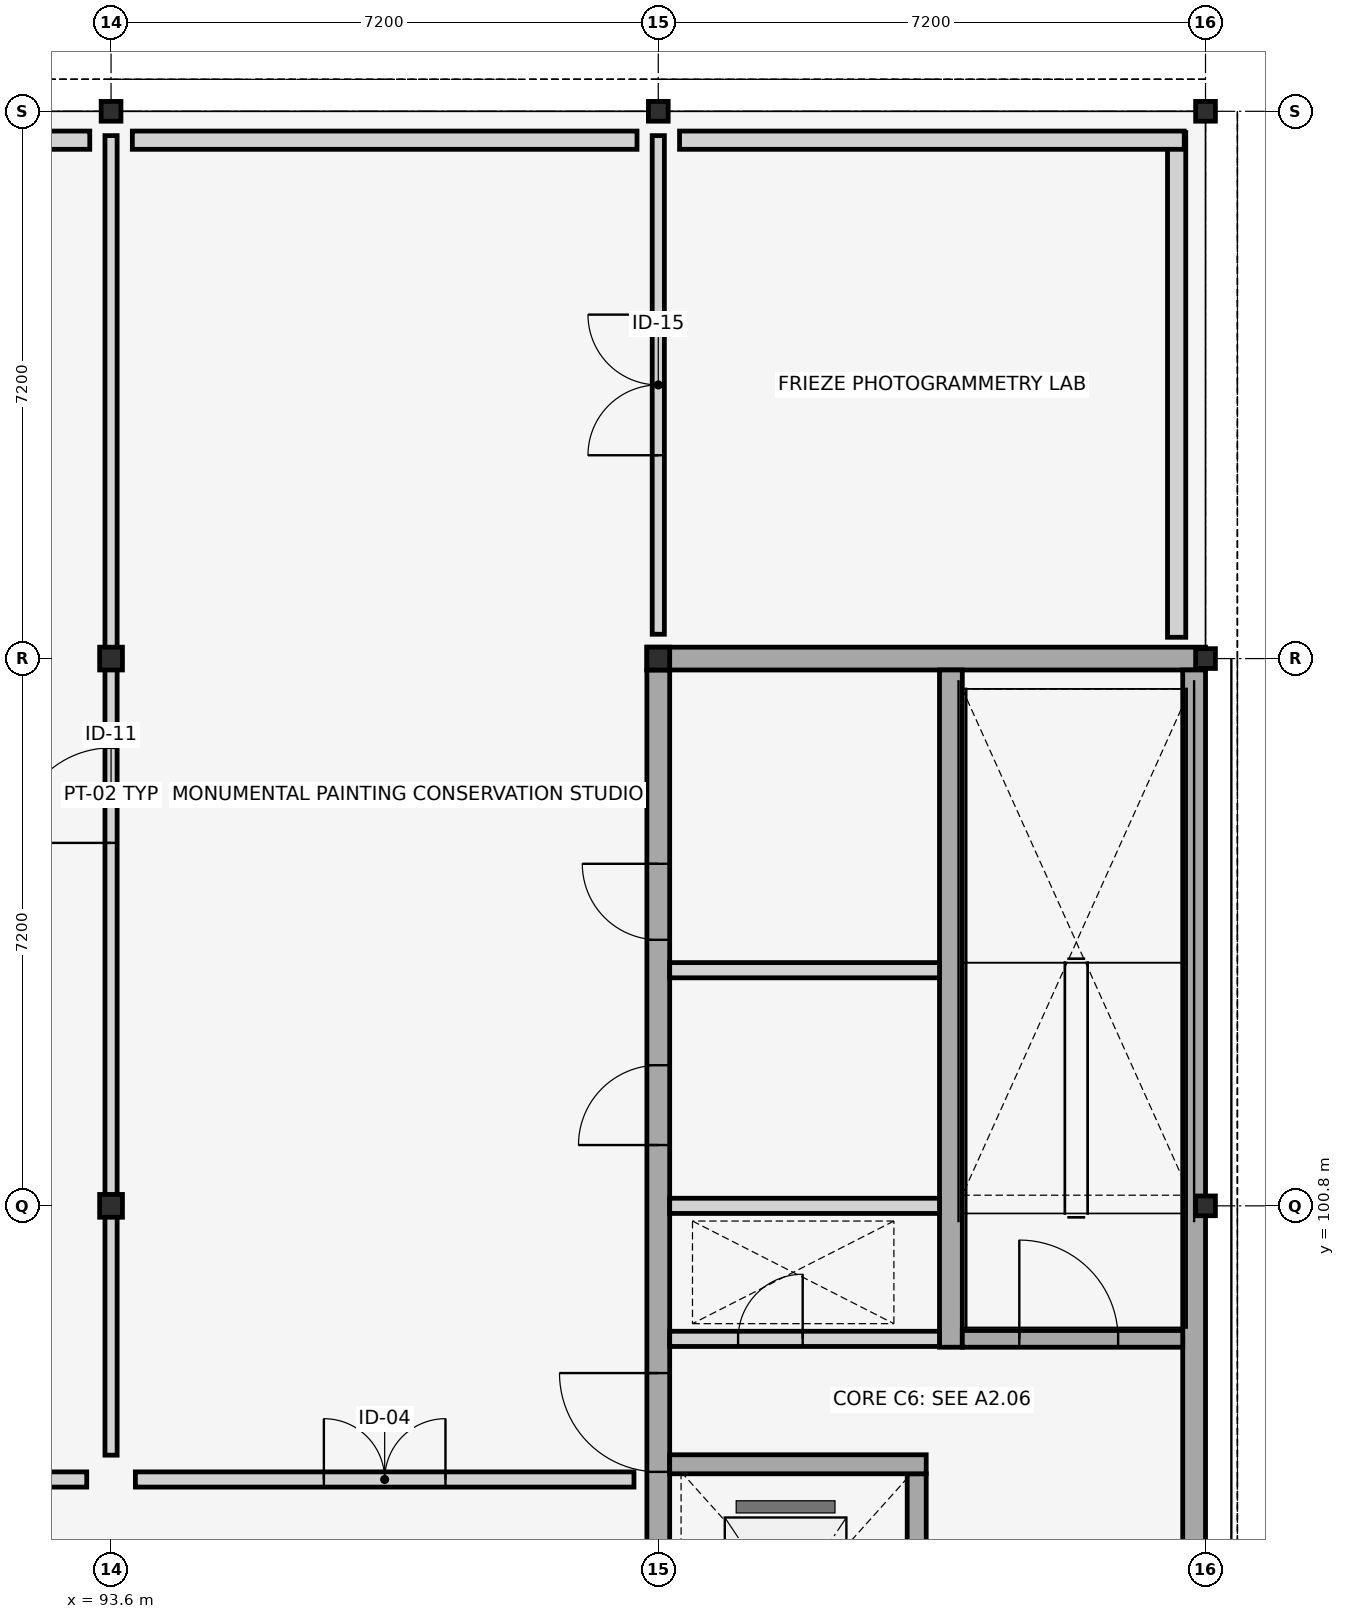
"""IFC4 building model, lengths in metres.
Left out: names, types, materials, properties, quantities, classifications, styles, units other than length and angle.
Written with IfcOpenShell. Run it as: python <this file> out.ifc"""

import sys

from ifc_helpers import new_model, si_unit, direction, frame, frame_2d, origin, origin_2d, place, context, subcontext, project, spatial, rectangle, i_section, extrude, element, fill, save


model = new_model("IFC4")
c1 = context("Model", 3, precision=1e-05, world=origin(), true_north=direction((0.0, 1.0)))
c2 = subcontext(c1, "Body", "Model", "MODEL_VIEW")
j1 = project(units=[si_unit("LENGTHUNIT", "METRE"), si_unit("PLANEANGLEUNIT", "RADIAN")], contexts=[c1])
p1 = place(None, origin())
s1 = spatial("IfcSite", under=j1, at=p1, CompositionType="ELEMENT")
p2 = place(p1, origin())
s2 = spatial("IfcBuilding", under=s1, at=p2, CompositionType="ELEMENT")
p3 = place(p2, frame((0.0, 0.0, 17.1)))
s3 = spatial("IfcBuildingStorey", under=s2, at=p3, CompositionType="ELEMENT", Elevation=17.1)
for number, where, z_axis, x_axis in (
    (1, (93.6, 100.8, 0.0), (0.0, 0.0, 1.0), (0.0, 1.0, 0.0)),
    (2, (93.6, 108.0, 0.0), (0.0, 0.0, 1.0), (1.0, 0.0, 0.0)),
):
    element("IfcColumn", number, at=place(p3, frame(where, z_axis=z_axis, x_axis=x_axis)), inside=s3, PredefinedType="COLUMN", context=c2, shape_type="SweptSolid", body=[
        extrude(i_section(OverallWidth=0.3, OverallDepth=0.3, WebThickness=0.011, FlangeThickness=0.019, FilletRadius=0.027, at=origin_2d()), origin(), (0.0, 0.0, 1.0), 8.1),
    ])
p4 = place(p3, frame((93.6, 115.2, 0.0), z_axis=(0.0, 0.0, 1.0), x_axis=(0.0, 1.0, 0.0)))
e3 = element("IfcColumn", 3, at=p4, inside=s3, PredefinedType="COLUMN", context=c2, shape_type="SweptSolid", body=[
    extrude(i_section(OverallWidth=0.26, OverallDepth=0.26, WebThickness=0.01, FlangeThickness=0.018, FilletRadius=0.024, at=origin_2d()), origin(), (0.0, 0.0, 1.0), 8.1),
])
p5 = place(p3, frame((100.8, 108.0, 0.0), z_axis=(0.0, 0.0, 1.0), x_axis=(0.0, 1.0, 0.0)))
e4 = element("IfcColumn", 4, at=p5, inside=s3, PredefinedType="COLUMN", context=c2, shape_type="SweptSolid", body=[
    extrude(i_section(OverallWidth=0.3, OverallDepth=0.3, WebThickness=0.011, FlangeThickness=0.019, FilletRadius=0.027, at=origin_2d()), origin(), (0.0, 0.0, 1.0), 8.1),
])
for number, where, z_axis, x_axis in (
    (5, (100.8, 115.2, 0.0), (0.0, 0.0, 1.0), (1.0, 0.0, 0.0)),
    (6, (108.0, 100.8, 0.0), (0.0, 0.0, 1.0), (0.0, 1.0, 0.0)),
    (7, (108.0, 108.0, 0.0), (0.0, 0.0, 1.0), (1.0, 0.0, 0.0)),
    (8, (108.0, 115.2, 0.0), (0.0, 0.0, 1.0), (0.0, 1.0, 0.0)),
):
    element("IfcColumn", number, at=place(p3, frame(where, z_axis=z_axis, x_axis=x_axis)), inside=s3, PredefinedType="COLUMN", context=c2, shape_type="SweptSolid", body=[
        extrude(i_section(OverallWidth=0.26, OverallDepth=0.26, WebThickness=0.01, FlangeThickness=0.018, FilletRadius=0.024, at=origin_2d()), origin(), (0.0, 0.0, 1.0), 8.1),
    ])
for number, where, z_axis, x_axis in (
    (9, (107.62, 108.28, 0.0), (0.0, 0.0, 1.0), (0.0, 1.0, 0.0)),
    (10, (107.72, 114.82, 0.0), (0.0, 0.0, 1.0), (-1.0, 0.0, 0.0)),
):
    element("IfcWall", number, at=place(p3, frame(where, z_axis=z_axis, x_axis=x_axis)), inside=s3, PredefinedType="STANDARD", context=c2, shape_type="SweptSolid", body=[
        extrude(rectangle(XDim=6.64, YDim=0.24, at=frame_2d((3.32, 0.0))), origin(), (0.0, 0.0, 1.0), 7.48),
    ])
for number, where, z_axis, x_axis in (
    (11, (100.52, 114.82, 0.0), (0.0, 0.0, 1.0), (-1.0, 0.0, 0.0)),
    (12, (93.32, 114.82, 0.0), (0.0, 0.0, 1.0), (-1.0, 0.0, 0.0)),
):
    element("IfcWall", number, at=place(p3, frame(where, z_axis=z_axis, x_axis=x_axis)), inside=s3, PredefinedType="STANDARD", context=c2, shape_type="SweptSolid", body=[
        extrude(rectangle(XDim=6.64, YDim=0.24, at=frame_2d((3.32, 0.0))), origin(), (0.0, 0.0, 1.0), 7.48),
    ])
p6 = place(p3, frame((100.65, 108.0, 0.0), z_axis=(0.0, 0.0, 1.0), x_axis=(1.0, 0.0, 0.0)))
e13 = element("IfcWall", 13, at=p6, inside=s3, PredefinedType="SHEAR", context=c2, shape_type="SweptSolid", body=[
    extrude(rectangle(XDim=7.35, YDim=0.3, at=frame_2d((3.675, 0.0))), origin(), (0.0, 0.0, 1.0), 7.88),
])
p7 = place(p3, frame((107.85, 93.75, 0.0), z_axis=(0.0, 0.0, 1.0), x_axis=(0.0, 1.0, 0.0)))
e14 = element("IfcWall", 14, at=p7, inside=s3, PredefinedType="SHEAR", context=c2, shape_type="SweptSolid", body=[
    extrude(rectangle(XDim=14.1, YDim=0.3, at=frame_2d((7.05, 0.0))), origin(), (0.0, 0.0, 1.0), 7.88),
])
p8 = place(p3, frame((100.8, 93.75, 0.0), z_axis=(0.0, 0.0, 1.0), x_axis=(0.0, 1.0, 0.0)))
e15 = element("IfcWall", 15, at=p8, inside=s3, PredefinedType="SHEAR", context=c2, shape_type="SweptSolid", body=[
    extrude(rectangle(XDim=14.1, YDim=0.3, at=frame_2d((7.05, 0.0))), origin(), (0.0, 0.0, 1.0), 7.88),
])
p9 = place(p8, frame((3.55, 0.0, 0.0)))
e16 = element("IfcOpeningElement", 16, at=p9, cuts=e15, PredefinedType="OPENING", context=c2, shape_type="SweptSolid", body=[
    extrude(rectangle(XDim=1.3, YDim=2.2, at=frame_2d((0.65, 1.1))), frame((0.0, 0.16, 0.0), z_axis=(0.0, -1.0, 0.0), x_axis=(1.0, 0.0, 0.0)), (0.0, 0.0, 1.0), 0.32),
])
p10 = place(p8, frame((7.85, 0.0, 0.0)))
e17 = element("IfcOpeningElement", 17, at=p10, cuts=e15, PredefinedType="OPENING", context=c2, shape_type="SweptSolid", body=[
    extrude(rectangle(XDim=1.05, YDim=2.15, at=frame_2d((0.525, 1.075))), frame((0.0, 0.16, 0.0), z_axis=(0.0, -1.0, 0.0), x_axis=(1.0, 0.0, 0.0)), (0.0, 0.0, 1.0), 0.32),
])
p11 = place(p8, frame((10.55, 0.0, 0.0)))
e18 = element("IfcOpeningElement", 18, at=p11, cuts=e15, PredefinedType="OPENING", context=c2, shape_type="SweptSolid", body=[
    extrude(rectangle(XDim=1.0, YDim=2.15, at=frame_2d((0.5, 1.075))), frame((0.0, 0.16, 0.0), z_axis=(0.0, -1.0, 0.0), x_axis=(1.0, 0.0, 0.0)), (0.0, 0.0, 1.0), 0.32),
])
p12 = place(p3, frame((104.2, 93.75, 0.0), z_axis=(0.0, 0.0, 1.0), x_axis=(0.0, 1.0, 0.0)))
e19 = element("IfcWall", 19, at=p12, inside=s3, PredefinedType="SHEAR", context=c2, shape_type="SweptSolid", body=[
    extrude(rectangle(XDim=3.525, YDim=0.25, at=frame_2d((1.762, 0.0))), origin(), (0.0, 0.0, 1.0), 7.88),
])
p13 = place(p12, frame((1.2, 0.0, 0.0)))
e20 = element("IfcOpeningElement", 20, at=p13, cuts=e19, PredefinedType="OPENING", context=c2, shape_type="SweptSolid", body=[
    extrude(rectangle(XDim=1.1, YDim=2.15, at=frame_2d((0.55, 1.075))), frame((0.0, 0.135, 0.0), z_axis=(0.0, -1.0, 0.0), x_axis=(1.0, 0.0, 0.0)), (0.0, 0.0, 1.0), 0.27),
])
p14 = place(p3, frame((104.65, 98.94, 0.0), z_axis=(0.0, 0.0, 1.0), x_axis=(0.0, 1.0, 0.0)))
e21 = element("IfcWall", 21, at=p14, inside=s3, PredefinedType="SHEAR", context=c2, shape_type="SweptSolid", body=[
    extrude(rectangle(XDim=8.91, YDim=0.3, at=frame_2d((4.455, 0.0))), origin(), (0.0, 0.0, 1.0), 7.88),
])
p15 = place(p3, frame((100.95, 99.05, 0.0), z_axis=(0.0, 0.0, 1.0), x_axis=(1.0, 0.0, 0.0)))
e22 = element("IfcWall", 22, at=p15, inside=s3, PredefinedType="PLUMBINGWALL", context=c2, shape_type="SweptSolid", body=[
    extrude(rectangle(XDim=3.55, YDim=0.2, at=frame_2d((1.775, 0.0))), origin(), (0.0, 0.0, 1.0), 7.3),
])
p16 = place(p15, frame((0.9, 0.0, 0.0)))
e23 = element("IfcOpeningElement", 23, at=p16, cuts=e22, PredefinedType="OPENING", context=c2, shape_type="SweptSolid", body=[
    extrude(rectangle(XDim=0.85, YDim=2.05, at=frame_2d((0.425, 1.025))), frame((0.0, 0.11, 0.0), z_axis=(0.0, -1.0, 0.0), x_axis=(1.0, 0.0, 0.0)), (0.0, 0.0, 1.0), 0.22),
])
p17 = place(p3, frame((104.8, 99.05, 0.0), z_axis=(0.0, 0.0, 1.0), x_axis=(1.0, 0.0, 0.0)))
e24 = element("IfcWall", 24, at=p17, inside=s3, PredefinedType="SHEAR", context=c2, shape_type="SweptSolid", body=[
    extrude(rectangle(XDim=2.9, YDim=0.22, at=frame_2d((1.45, 0.0))), origin(), (0.0, 0.0, 1.0), 7.88),
])
p18 = place(p17, frame((0.75, 0.0, 0.0)))
e25 = element("IfcOpeningElement", 25, at=p18, cuts=e24, PredefinedType="OPENING", context=c2, shape_type="SweptSolid", body=[
    extrude(rectangle(XDim=1.3, YDim=2.2, at=frame_2d((0.65, 1.1))), frame((0.0, 0.12, 0.0), z_axis=(0.0, -1.0, 0.0), x_axis=(1.0, 0.0, 0.0)), (0.0, 0.0, 1.0), 0.24),
])
p19 = place(p3, frame((100.95, 97.4, 0.0), z_axis=(0.0, 0.0, 1.0), x_axis=(1.0, 0.0, 0.0)))
e26 = element("IfcWall", 26, at=p19, inside=s3, PredefinedType="SHEAR", context=c2, shape_type="SweptSolid", body=[
    extrude(rectangle(XDim=3.375, YDim=0.25, at=frame_2d((1.688, 0.0))), origin(), (0.0, 0.0, 1.0), 7.88),
])
for number, where, z_axis, x_axis in (
    (27, (100.95, 100.8, 0.0), (0.0, 0.0, 1.0), (1.0, 0.0, 0.0)),
    (28, (100.95, 103.9, 0.0), (0.0, 0.0, 1.0), (1.0, 0.0, 0.0)),
):
    element("IfcWall", number, at=place(p3, frame(where, z_axis=z_axis, x_axis=x_axis)), inside=s3, PredefinedType="PLUMBINGWALL", context=c2, shape_type="SweptSolid", body=[
        extrude(rectangle(XDim=3.55, YDim=0.2, at=frame_2d((1.775, 0.0))), origin(), (0.0, 0.0, 1.0), 7.3),
    ])
p20 = place(p3, frame((65.12, 97.2, 0.0), z_axis=(0.0, 0.0, 1.0), x_axis=(1.0, 0.0, 0.0)))
e29 = element("IfcWall", 29, at=p20, inside=s3, PredefinedType="PARTITIONING", context=c2, shape_type="SweptSolid", body=[
    extrude(rectangle(XDim=28.16, YDim=0.2, at=frame_2d((14.08, 0.0))), origin(), (0.0, 0.0, 1.0), 7.05),
])
p21 = place(p20, frame((1.649, 0.0, 0.0)))
e30 = element("IfcOpeningElement", 30, at=p21, cuts=e29, PredefinedType="OPENING", context=c2, shape_type="SweptSolid", body=[
    extrude(rectangle(XDim=1.6, YDim=2.35, at=frame_2d((0.8, 1.175))), frame((0.0, 0.11, 0.0), z_axis=(0.0, -1.0, 0.0), x_axis=(1.0, 0.0, 0.0)), (0.0, 0.0, 1.0), 0.22),
])
p22 = place(p3, frame((93.92, 97.2, 0.0), z_axis=(0.0, 0.0, 1.0), x_axis=(1.0, 0.0, 0.0)))
e31 = element("IfcWall", 31, at=p22, inside=s3, PredefinedType="PARTITIONING", context=c2, shape_type="SweptSolid", body=[
    extrude(rectangle(XDim=6.56, YDim=0.2, at=frame_2d((3.28, 0.0))), origin(), (0.0, 0.0, 1.0), 7.05),
])
p23 = place(p22, frame((2.48, 0.0, 0.0)))
e32 = element("IfcOpeningElement", 32, at=p23, cuts=e31, PredefinedType="OPENING", context=c2, shape_type="SweptSolid", body=[
    extrude(rectangle(XDim=1.6, YDim=2.35, at=frame_2d((0.8, 1.175))), frame((0.0, 0.11, 0.0), z_axis=(0.0, -1.0, 0.0), x_axis=(1.0, 0.0, 0.0)), (0.0, 0.0, 1.0), 0.22),
])
p24 = place(p3, frame((93.6, 97.52, 0.0), z_axis=(0.0, 0.0, 1.0), x_axis=(0.0, 1.0, 0.0)))
e33 = element("IfcWall", 33, at=p24, inside=s3, PredefinedType="PARTITIONING", context=c2, shape_type="SweptSolid", body=[
    extrude(rectangle(XDim=17.36, YDim=0.16, at=frame_2d((8.68, 0.0))), origin(), (0.0, 0.0, 1.0), 7.05),
])
p25 = place(p24, frame((8.055, 0.0, 0.0)))
e34 = element("IfcOpeningElement", 34, at=p25, cuts=e33, PredefinedType="OPENING", context=c2, shape_type="SweptSolid", body=[
    extrude(rectangle(XDim=1.25, YDim=2.3, at=frame_2d((0.625, 1.15))), frame((0.0, 0.09, 0.0), z_axis=(0.0, -1.0, 0.0), x_axis=(1.0, 0.0, 0.0)), (0.0, 0.0, 1.0), 0.18),
])
p26 = place(p3, frame((100.8, 108.32, 0.0), z_axis=(0.0, 0.0, 1.0), x_axis=(0.0, 1.0, 0.0)))
e35 = element("IfcWall", 35, at=p26, inside=s3, PredefinedType="PARTITIONING", context=c2, shape_type="SweptSolid", body=[
    extrude(rectangle(XDim=6.56, YDim=0.16, at=frame_2d((3.28, 0.0))), origin(), (0.0, 0.0, 1.0), 7.05),
])
p27 = place(p26, frame((2.355, 0.0, 0.0)))
e36 = element("IfcOpeningElement", 36, at=p27, cuts=e35, PredefinedType="OPENING", context=c2, shape_type="SweptSolid", body=[
    extrude(rectangle(XDim=1.85, YDim=2.5, at=frame_2d((0.925, 1.25))), frame((0.0, 0.09, 0.0), z_axis=(0.0, -1.0, 0.0), x_axis=(1.0, 0.0, 0.0)), (0.0, 0.0, 1.0), 0.18),
])
p28 = place(p9, origin())
e37 = element("IfcDoor", 37, at=p28, inside=s3, OperationType="SINGLE_SWING_RIGHT", PredefinedType="DOOR", context=c2, shape_type="SweptSolid", body=[
    extrude(rectangle(XDim=1.3, YDim=2.2, at=frame_2d((0.65, 1.1))), frame((0.0, 0.025, 0.0), z_axis=(0.0, -1.0, 0.0), x_axis=(1.0, 0.0, 0.0)), (0.0, 0.0, 1.0), 0.05),
])
fill(e16, e37)
p29 = place(p10, origin())
e38 = element("IfcDoor", 38, at=p29, inside=s3, OperationType="SINGLE_SWING_LEFT", PredefinedType="DOOR", context=c2, shape_type="SweptSolid", body=[
    extrude(rectangle(XDim=1.05, YDim=2.15, at=frame_2d((0.525, 1.075))), frame((0.0, 0.025, 0.0), z_axis=(0.0, -1.0, 0.0), x_axis=(1.0, 0.0, 0.0)), (0.0, 0.0, 1.0), 0.05),
])
fill(e17, e38)
p30 = place(p11, origin())
e39 = element("IfcDoor", 39, at=p30, inside=s3, OperationType="SINGLE_SWING_RIGHT", PredefinedType="DOOR", context=c2, shape_type="SweptSolid", body=[
    extrude(rectangle(XDim=1.0, YDim=2.15, at=frame_2d((0.5, 1.075))), frame((0.0, 0.025, 0.0), z_axis=(0.0, -1.0, 0.0), x_axis=(1.0, 0.0, 0.0)), (0.0, 0.0, 1.0), 0.05),
])
fill(e18, e39)
p31 = place(p16, origin())
e40 = element("IfcDoor", 40, at=p31, inside=s3, OperationType="SINGLE_SWING_RIGHT", PredefinedType="TRAPDOOR", context=c2, shape_type="SweptSolid", body=[
    extrude(rectangle(XDim=0.85, YDim=2.05, at=frame_2d((0.425, 1.025))), frame((0.0, 0.025, 0.0), z_axis=(0.0, -1.0, 0.0), x_axis=(1.0, 0.0, 0.0)), (0.0, 0.0, 1.0), 0.05),
])
fill(e23, e40)
p32 = place(p18, origin())
e41 = element("IfcDoor", 41, at=p32, inside=s3, OperationType="SINGLE_SWING_LEFT", PredefinedType="DOOR", context=c2, shape_type="SweptSolid", body=[
    extrude(rectangle(XDim=1.3, YDim=2.2, at=frame_2d((0.65, 1.1))), frame((0.0, 0.025, 0.0), z_axis=(0.0, -1.0, 0.0), x_axis=(1.0, 0.0, 0.0)), (0.0, 0.0, 1.0), 0.05),
])
fill(e25, e41)
p33 = place(p23, origin())
e42 = element("IfcDoor", 42, at=p33, inside=s3, OperationType="DOUBLE_DOOR_SINGLE_SWING", PredefinedType="DOOR", context=c2, shape_type="SweptSolid", body=[
    extrude(rectangle(XDim=1.6, YDim=2.35, at=frame_2d((0.8, 1.175))), frame((0.0, 0.025, 0.0), z_axis=(0.0, -1.0, 0.0), x_axis=(1.0, 0.0, 0.0)), (0.0, 0.0, 1.0), 0.05),
])
fill(e32, e42)
p34 = place(p25, origin())
e43 = element("IfcDoor", 43, at=p34, inside=s3, OperationType="SINGLE_SWING_LEFT", PredefinedType="DOOR", context=c2, shape_type="SweptSolid", body=[
    extrude(rectangle(XDim=1.25, YDim=2.3, at=frame_2d((0.625, 1.15))), frame((0.0, 0.025, 0.0), z_axis=(0.0, -1.0, 0.0), x_axis=(1.0, 0.0, 0.0)), (0.0, 0.0, 1.0), 0.05),
])
fill(e34, e43)
p35 = place(p27, origin())
e44 = element("IfcDoor", 44, at=p35, inside=s3, OperationType="DOUBLE_DOOR_SINGLE_SWING", PredefinedType="DOOR", context=c2, shape_type="SweptSolid", body=[
    extrude(rectangle(XDim=1.85, YDim=2.5, at=frame_2d((0.925, 1.25))), frame((0.0, 0.025, 0.0), z_axis=(0.0, -1.0, 0.0), x_axis=(1.0, 0.0, 0.0)), (0.0, 0.0, 1.0), 0.05),
])
fill(e36, e44)
save(model, sys.argv[1])
